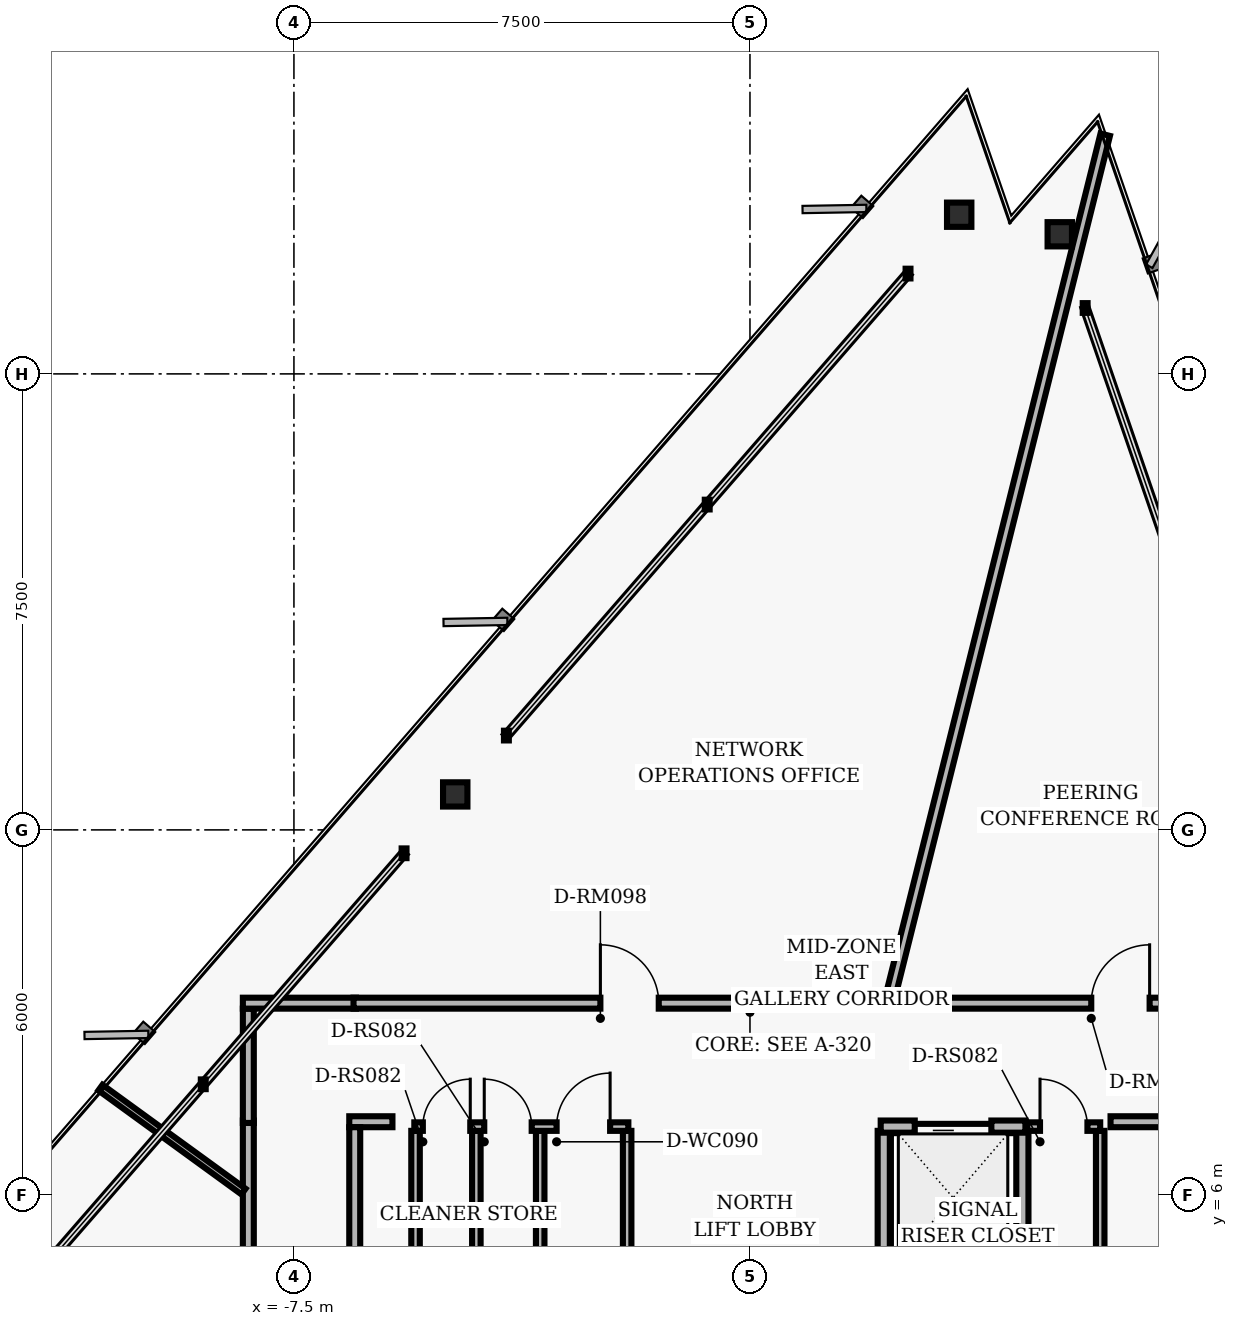
"""IFC4 building model, lengths in metres.
Left out: names, types, materials, properties, quantities, classifications, styles, units other than length and angle.
Written with IfcOpenShell. Run it as: python <this file> out.ifc"""

import sys

from ifc_helpers import new_model, si_unit, direction, frame, frame_2d, origin, origin_2d, place, context, subcontext, project, spatial, rectangle, i_section, extrude, element, fill, save


model = new_model("IFC4")
c1 = context("Model", 3, precision=1e-05, world=origin(), true_north=direction((0.0, 1.0)))
c2 = subcontext(c1, "Body", "Model", "MODEL_VIEW")
j1 = project(units=[si_unit("LENGTHUNIT", "METRE"), si_unit("PLANEANGLEUNIT", "RADIAN")], contexts=[c1])
p1 = place(None, origin())
s1 = spatial("IfcSite", under=j1, at=p1, CompositionType="ELEMENT")
p2 = place(p1, origin())
s2 = spatial("IfcBuilding", under=s1, at=p2, CompositionType="ELEMENT")
p3 = place(p2, frame((0.0, 0.0, 147.2)))
s3 = spatial("IfcBuildingStorey", under=s2, at=p3, CompositionType="ELEMENT", Elevation=147.2)
for number, where, z_axis, x_axis in (
    (1, (5.095, 21.796, 0.0), (0.0, 0.0, 1.0), (1.0, 0.0, 0.0)),
    (2, (3.441, 22.118, 0.0), (0.0, 0.0, 1.0), (1.0, 0.0, 0.0)),
    (3, (-4.847, 12.583, 0.0), (0.0, 0.0, 1.0), (1.0, 0.0, 0.0)),
):
    element("IfcColumn", number, at=place(p3, frame(where, z_axis=z_axis, x_axis=x_axis)), inside=s3, PredefinedType="COLUMN", context=c2, shape_type="SweptSolid", body=[
        extrude(i_section(OverallWidth=0.401, OverallDepth=0.399, WebThickness=0.025, FlangeThickness=0.04, FilletRadius=0.018, at=origin_2d()), origin(), (0.0, 0.0, 1.0), 3.04),
    ])
for number, where, z_axis, x_axis in (
    (4, (2.2, 4.95, 0.0), (0.0, 0.0, 1.0), (0.0, 1.0, 0.0)),
    (5, (4.48, 4.95, 0.0), (0.0, 0.0, 1.0), (0.0, 1.0, 0.0)),
):
    element("IfcWall", number, at=place(p3, frame(where, z_axis=z_axis, x_axis=x_axis)), inside=s3, PredefinedType="PARTITIONING", context=c2, shape_type="SweptSolid", body=[
        extrude(rectangle(XDim=2.1, YDim=0.2, at=frame_2d((1.05, 0.0))), origin(), (0.0, 0.0, 1.0), 2.763),
    ])
p4 = place(p3, frame((2.15, 7.12, 0.0), z_axis=(0.0, 0.0, 1.0), x_axis=(1.0, 0.0, 0.0)))
e6 = element("IfcWall", 6, at=p4, inside=s3, PredefinedType="PARTITIONING", context=c2, shape_type="SweptSolid", body=[
    extrude(rectangle(XDim=2.38, YDim=0.2, at=frame_2d((1.19, 0.0))), origin(), (0.0, 0.0, 1.0), 2.763),
])
p5 = place(p4, frame((0.56, 0.0, 0.0)))
e7 = element("IfcOpeningElement", 7, at=p5, cuts=e6, PredefinedType="OPENING", context=c2, shape_type="SweptSolid", body=[
    extrude(rectangle(XDim=1.26, YDim=2.06, at=frame_2d((0.63, 1.03))), frame((0.0, 0.11, 0.0), z_axis=(0.0, -1.0, 0.0), x_axis=(1.0, 0.0, 0.0)), (0.0, 0.0, 1.0), 0.22),
])
for number, where, z_axis, x_axis in (
    (8, (-5.5, 4.95, 0.0), (0.0, 0.0, 1.0), (0.0, 1.0, 0.0)),
    (9, (-4.5, 4.95, 0.0), (0.0, 0.0, 1.0), (0.0, 1.0, 0.0)),
    (10, (-3.45, 4.95, 0.0), (0.0, 0.0, 1.0), (0.0, 1.0, 0.0)),
    (11, (-2.02, 4.95, 0.0), (0.0, 0.0, 1.0), (0.0, 1.0, 0.0)),
):
    element("IfcWall", number, at=place(p3, frame(where, z_axis=z_axis, x_axis=x_axis)), inside=s3, PredefinedType="PARTITIONING", context=c2, shape_type="SweptSolid", body=[
        extrude(rectangle(XDim=2.1, YDim=0.14, at=frame_2d((1.05, 0.0))), origin(), (0.0, 0.0, 1.0), 2.763),
    ])
p6 = place(p3, frame((-5.52, 7.12, 0.0), z_axis=(0.0, 0.0, 1.0), x_axis=(1.0, 0.0, 0.0)))
e12 = element("IfcWall", 12, at=p6, inside=s3, PredefinedType="PARTITIONING", context=c2, shape_type="SweptSolid", body=[
    extrude(rectangle(XDim=3.52, YDim=0.14, at=frame_2d((1.76, 0.0))), origin(), (0.0, 0.0, 1.0), 2.763),
])
p7 = place(p6, frame((0.14, 0.0, 0.0)))
e13 = element("IfcOpeningElement", 13, at=p7, cuts=e12, PredefinedType="OPENING", context=c2, shape_type="SweptSolid", body=[
    extrude(rectangle(XDim=0.78, YDim=2.01, at=frame_2d((0.39, 1.005))), frame((0.0, 0.08, 0.0), z_axis=(0.0, -1.0, 0.0), x_axis=(1.0, 0.0, 0.0)), (0.0, 0.0, 1.0), 0.16),
])
p8 = place(p6, frame((1.15, 0.0, 0.0)))
e14 = element("IfcOpeningElement", 14, at=p8, cuts=e12, PredefinedType="OPENING", context=c2, shape_type="SweptSolid", body=[
    extrude(rectangle(XDim=0.78, YDim=2.01, at=frame_2d((0.39, 1.005))), frame((0.0, 0.08, 0.0), z_axis=(0.0, -1.0, 0.0), x_axis=(1.0, 0.0, 0.0)), (0.0, 0.0, 1.0), 0.16),
])
p9 = place(p6, frame((2.34, 0.0, 0.0)))
e15 = element("IfcOpeningElement", 15, at=p9, cuts=e12, PredefinedType="OPENING", context=c2, shape_type="SweptSolid", body=[
    extrude(rectangle(XDim=0.88, YDim=2.02, at=frame_2d((0.44, 1.01))), frame((0.0, 0.08, 0.0), z_axis=(0.0, -1.0, 0.0), x_axis=(1.0, 0.0, 0.0)), (0.0, 0.0, 1.0), 0.16),
])
p10 = place(p3, frame((5.76, 4.95, 0.0), z_axis=(0.0, 0.0, 1.0), x_axis=(0.0, 1.0, 0.0)))
e16 = element("IfcWall", 16, at=p10, inside=s3, PredefinedType="PARTITIONING", context=c2, shape_type="SweptSolid", body=[
    extrude(rectangle(XDim=2.1, YDim=0.14, at=frame_2d((1.05, 0.0))), origin(), (0.0, 0.0, 1.0), 2.763),
])
p11 = place(p3, frame((4.56, 7.12, 0.0), z_axis=(0.0, 0.0, 1.0), x_axis=(1.0, 0.0, 0.0)))
e17 = element("IfcWall", 17, at=p11, inside=s3, PredefinedType="PARTITIONING", context=c2, shape_type="SweptSolid", body=[
    extrude(rectangle(XDim=1.2, YDim=0.14, at=frame_2d((0.6, 0.0))), origin(), (0.0, 0.0, 1.0), 2.763),
])
p12 = place(p11, frame((0.21, 0.0, 0.0)))
e18 = element("IfcOpeningElement", 18, at=p12, cuts=e17, PredefinedType="OPENING", context=c2, shape_type="SweptSolid", body=[
    extrude(rectangle(XDim=0.78, YDim=2.01, at=frame_2d((0.39, 1.005))), frame((0.0, 0.08, 0.0), z_axis=(0.0, -1.0, 0.0), x_axis=(1.0, 0.0, 0.0)), (0.0, 0.0, 1.0), 0.16),
])
p13 = place(p3, frame((-8.25, -7.22, 0.0), z_axis=(0.0, 0.0, 1.0), x_axis=(0.0, 1.0, 0.0)))
e19 = element("IfcWall", 19, at=p13, inside=s3, PredefinedType="PARTITIONING", context=c2, shape_type="SweptSolid", body=[
    extrude(rectangle(XDim=14.44, YDim=0.18, at=frame_2d((7.22, 0.0))), origin(), (0.0, 0.0, 1.0), 2.763),
])
p14 = place(p13, frame((7.366, 0.0, 0.0)))
e20 = element("IfcOpeningElement", 20, at=p14, cuts=e19, PredefinedType="OPENING", context=c2, shape_type="SweptSolid", body=[
    extrude(rectangle(XDim=0.96, YDim=2.02, at=frame_2d((0.48, 1.01))), frame((0.0, 0.1, 0.0), z_axis=(0.0, -1.0, 0.0), x_axis=(1.0, 0.0, 0.0)), (0.0, 0.0, 1.0), 0.2),
])
p15 = place(p3, frame((-8.25, 7.18, 0.0), z_axis=(0.0, 0.0, 1.0), x_axis=(0.0, 1.0, 0.0)))
e21 = element("IfcWall", 21, at=p15, inside=s3, PredefinedType="PARTITIONING", context=c2, shape_type="SweptSolid", body=[
    extrude(rectangle(XDim=1.88, YDim=0.18, at=frame_2d((0.94, 0.0))), origin(), (0.0, 0.0, 1.0), 2.763),
])
p16 = place(p3, frame((-8.34, 9.15, 0.0), z_axis=(0.0, 0.0, 1.0), x_axis=(1.0, 0.0, 0.0)))
e22 = element("IfcWall", 22, at=p16, inside=s3, PredefinedType="PARTITIONING", context=c2, shape_type="SweptSolid", body=[
    extrude(rectangle(XDim=1.86, YDim=0.18, at=frame_2d((0.93, 0.0))), origin(), (0.0, 0.0, 1.0), 2.763),
])
p17 = place(p3, frame((-6.52, 9.15, 0.0), z_axis=(0.0, 0.0, 1.0), x_axis=(1.0, 0.0, 0.0)))
e23 = element("IfcWall", 23, at=p17, inside=s3, PredefinedType="PARTITIONING", context=c2, shape_type="SweptSolid", body=[
    extrude(rectangle(XDim=16.662, YDim=0.18, at=frame_2d((8.331, 0.0))), origin(), (0.0, 0.0, 1.0), 2.763),
])
p18 = place(p17, frame((12.133, 0.0, 0.0)))
e24 = element("IfcOpeningElement", 24, at=p18, cuts=e23, PredefinedType="OPENING", context=c2, shape_type="SweptSolid", body=[
    extrude(rectangle(XDim=0.96, YDim=2.02, at=frame_2d((0.48, 1.01))), frame((0.0, 0.1, 0.0), z_axis=(0.0, -1.0, 0.0), x_axis=(1.0, 0.0, 0.0)), (0.0, 0.0, 1.0), 0.2),
])
p19 = place(p17, frame((4.06, 0.0, 0.0)))
e25 = element("IfcOpeningElement", 25, at=p19, cuts=e23, PredefinedType="OPENING", context=c2, shape_type="SweptSolid", body=[
    extrude(rectangle(XDim=0.96, YDim=2.02, at=frame_2d((0.48, 1.01))), frame((0.0, 0.1, 0.0), z_axis=(0.0, -1.0, 0.0), x_axis=(1.0, 0.0, 0.0)), (0.0, 0.0, 1.0), 0.2),
])
p20 = place(p3, frame((10.814, 7.2, 0.0), z_axis=(0.0, 0.0, 1.0), x_axis=(-1.0, 0.0, 0.0)))
e26 = element("IfcWall", 26, at=p20, inside=s3, PredefinedType="PARTITIONING", context=c2, shape_type="SweptSolid", body=[
    extrude(rectangle(XDim=4.884, YDim=0.18, at=frame_2d((2.442, 0.0))), origin(), (0.0, 0.0, 1.0), 2.763),
])
p21 = place(p3, frame((-5.88, 7.2, 0.0), z_axis=(0.0, 0.0, 1.0), x_axis=(-1.0, 0.0, 0.0)))
e27 = element("IfcWall", 27, at=p21, inside=s3, PredefinedType="PARTITIONING", context=c2, shape_type="SweptSolid", body=[
    extrude(rectangle(XDim=0.71, YDim=0.18, at=frame_2d((0.355, 0.0))), origin(), (0.0, 0.0, 1.0), 2.763),
])
p22 = place(p3, frame((-6.5, 7.11, 0.0), z_axis=(0.0, 0.0, 1.0), x_axis=(0.0, -1.0, 0.0)))
e28 = element("IfcWall", 28, at=p22, inside=s3, PredefinedType="PARTITIONING", context=c2, shape_type="SweptSolid", body=[
    extrude(rectangle(XDim=2.058, YDim=0.18, at=frame_2d((1.029, 0.0))), origin(), (0.0, 0.0, 1.0), 2.763),
])
p23 = place(p3, frame((2.301, 9.23, 0.0), z_axis=(0.0, 0.0, 1.0), x_axis=(0.241931245301, 0.970293395086, 0.0)))
e29 = element("IfcWall", 29, at=p23, inside=s3, PredefinedType="PARTITIONING", context=c2, shape_type="SweptSolid", body=[
    extrude(rectangle(XDim=14.638, YDim=0.16, at=frame_2d((7.319, 0.0))), origin(), (0.0, 0.0, 1.0), 2.763),
])
p24 = place(p3, frame((-8.33, 6.052, 0.0), z_axis=(0.0, 0.0, 1.0), x_axis=(-0.808997455981, 0.587812143644, 0.0)))
e30 = element("IfcWall", 30, at=p24, inside=s3, PredefinedType="MOVABLE", context=c2, shape_type="SweptSolid", body=[
    extrude(rectangle(XDim=2.907, YDim=0.115, at=frame_2d((1.454, 0.0))), origin(), (0.0, 0.0, 1.0), 2.763),
])
p25 = place(p5, origin())
e31 = element("IfcDoor", 31, at=p25, inside=s3, OperationType="SLIDING_TO_LEFT", PredefinedType="DOOR", context=c2, shape_type="SweptSolid", body=[
    extrude(rectangle(XDim=1.26, YDim=2.06, at=frame_2d((0.63, 1.03))), frame((0.0, 0.025, 0.0), z_axis=(0.0, -1.0, 0.0), x_axis=(1.0, 0.0, 0.0)), (0.0, 0.0, 1.0), 0.05),
])
fill(e7, e31)
p26 = place(p7, origin())
e32 = element("IfcDoor", 32, at=p26, inside=s3, OperationType="SINGLE_SWING_RIGHT", PredefinedType="DOOR", context=c2, shape_type="SweptSolid", body=[
    extrude(rectangle(XDim=0.78, YDim=2.01, at=frame_2d((0.39, 1.005))), frame((0.0, 0.025, 0.0), z_axis=(0.0, -1.0, 0.0), x_axis=(1.0, 0.0, 0.0)), (0.0, 0.0, 1.0), 0.05),
])
fill(e13, e32)
p27 = place(p8, origin())
e33 = element("IfcDoor", 33, at=p27, inside=s3, OperationType="SINGLE_SWING_LEFT", PredefinedType="DOOR", context=c2, shape_type="SweptSolid", body=[
    extrude(rectangle(XDim=0.78, YDim=2.01, at=frame_2d((0.39, 1.005))), frame((0.0, 0.025, 0.0), z_axis=(0.0, -1.0, 0.0), x_axis=(1.0, 0.0, 0.0)), (0.0, 0.0, 1.0), 0.05),
])
fill(e14, e33)
p28 = place(p9, origin())
e34 = element("IfcDoor", 34, at=p28, inside=s3, OperationType="SINGLE_SWING_RIGHT", PredefinedType="DOOR", context=c2, shape_type="SweptSolid", body=[
    extrude(rectangle(XDim=0.88, YDim=2.02, at=frame_2d((0.44, 1.01))), frame((0.0, 0.025, 0.0), z_axis=(0.0, -1.0, 0.0), x_axis=(1.0, 0.0, 0.0)), (0.0, 0.0, 1.0), 0.05),
])
fill(e15, e34)
p29 = place(p12, origin())
e35 = element("IfcDoor", 35, at=p29, inside=s3, OperationType="SINGLE_SWING_LEFT", PredefinedType="DOOR", context=c2, shape_type="SweptSolid", body=[
    extrude(rectangle(XDim=0.78, YDim=2.01, at=frame_2d((0.39, 1.005))), frame((0.0, 0.025, 0.0), z_axis=(0.0, -1.0, 0.0), x_axis=(1.0, 0.0, 0.0)), (0.0, 0.0, 1.0), 0.05),
])
fill(e18, e35)
p30 = place(p18, origin())
e36 = element("IfcDoor", 36, at=p30, inside=s3, OperationType="SINGLE_SWING_RIGHT", PredefinedType="DOOR", context=c2, shape_type="SweptSolid", body=[
    extrude(rectangle(XDim=0.96, YDim=2.02, at=frame_2d((0.48, 1.01))), frame((0.0, 0.025, 0.0), z_axis=(0.0, -1.0, 0.0), x_axis=(1.0, 0.0, 0.0)), (0.0, 0.0, 1.0), 0.05),
])
fill(e24, e36)
p31 = place(p19, origin())
e37 = element("IfcDoor", 37, at=p31, inside=s3, OperationType="SINGLE_SWING_LEFT", PredefinedType="DOOR", context=c2, shape_type="SweptSolid", body=[
    extrude(rectangle(XDim=0.96, YDim=2.02, at=frame_2d((0.48, 1.01))), frame((0.0, 0.025, 0.0), z_axis=(0.0, -1.0, 0.0), x_axis=(1.0, 0.0, 0.0)), (0.0, 0.0, 1.0), 0.05),
])
fill(e25, e37)
save(model, sys.argv[1])
